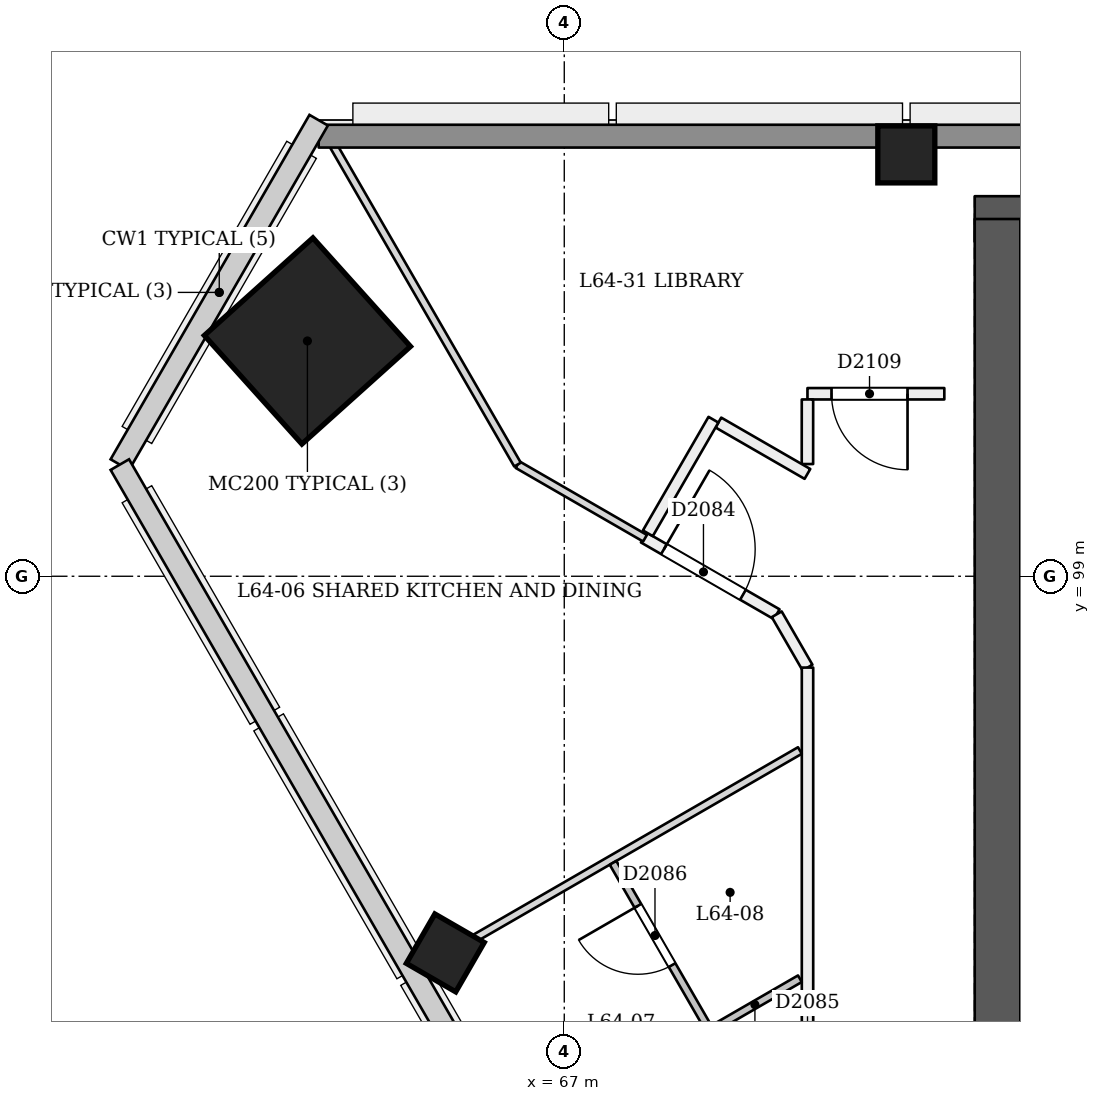
"""IFC4 building model, lengths in metres.
Left out: names, types, materials, properties, quantities, classifications, styles, units other than length and angle.
Written with IfcOpenShell. Run it as: python <this file> out.ifc"""

import sys

from ifc_helpers import new_model, si_unit, direction, frame, frame_2d, origin, origin_2d, place, context, subcontext, project, spatial, rectangle, extrude, element, fill, save


model = new_model("IFC4")
c1 = context("Model", 3, precision=1e-05, world=origin(), true_north=direction((0.0, 1.0)))
c2 = subcontext(c1, "Body", "Model", "MODEL_VIEW")
j1 = project(units=[si_unit("LENGTHUNIT", "METRE"), si_unit("PLANEANGLEUNIT", "RADIAN")], contexts=[c1])
p1 = place(None, origin())
s1 = spatial("IfcSite", under=j1, at=p1, CompositionType="ELEMENT")
p2 = place(p1, origin())
s2 = spatial("IfcBuilding", under=s1, at=p2, CompositionType="ELEMENT")
p3 = place(p2, frame((0.0, 0.0, 250.0)))
s3 = spatial("IfcBuildingStorey", under=s2, at=p3, CompositionType="ELEMENT", Elevation=250.0)
p4 = place(p3, frame((72.7, 93.1, 0.0), z_axis=(0.0, 0.0, 1.0), x_axis=(1.0, 0.0, 0.0)))
e1 = element("IfcWall", 1, at=p4, inside=s3, PredefinedType="SHEAR", context=c2, shape_type="SweptSolid", body=[
    extrude(rectangle(XDim=24.9, YDim=0.6, at=frame_2d((12.45, 0.0))), origin(), (0.0, 0.0, 1.0), 3.6),
])
p5 = place(p4, frame((1.1, 0.0, 0.0)))
e2 = element("IfcOpeningElement", 2, at=p5, cuts=e1, PredefinedType="OPENING", context=c2, shape_type="SweptSolid", body=[
    extrude(rectangle(XDim=1.2, YDim=2.1, at=frame_2d((0.6, 1.05))), frame((0.0, 0.311, 0.0), z_axis=(0.0, -1.0, 0.0), x_axis=(1.0, 0.0, 0.0)), (0.0, 0.0, 1.0), 0.621),
])
p6 = place(p4, frame((3.3, 0.0, 0.0)))
e3 = element("IfcOpeningElement", 3, at=p6, cuts=e1, PredefinedType="OPENING", context=c2, shape_type="SweptSolid", body=[
    extrude(rectangle(XDim=1.2, YDim=2.1, at=frame_2d((0.6, 1.05))), frame((0.0, 0.311, 0.0), z_axis=(0.0, -1.0, 0.0), x_axis=(1.0, 0.0, 0.0)), (0.0, 0.0, 1.0), 0.621),
])
p7 = place(p4, frame((13.3, 0.0, 0.0)))
e4 = element("IfcOpeningElement", 4, at=p7, cuts=e1, PredefinedType="OPENING", context=c2, shape_type="SweptSolid", body=[
    extrude(rectangle(XDim=1.2, YDim=2.1, at=frame_2d((0.6, 1.05))), frame((0.0, 0.311, 0.0), z_axis=(0.0, -1.0, 0.0), x_axis=(1.0, 0.0, 0.0)), (0.0, 0.0, 1.0), 0.621),
])
p8 = place(p4, frame((16.012, 0.0, 0.0)))
e5 = element("IfcOpeningElement", 5, at=p8, cuts=e1, PredefinedType="OPENING", context=c2, shape_type="SweptSolid", body=[
    extrude(rectangle(XDim=1.0, YDim=2.1, at=frame_2d((0.5, 1.05))), frame((0.0, 0.311, 0.0), z_axis=(0.0, -1.0, 0.0), x_axis=(1.0, 0.0, 0.0)), (0.0, 0.0, 1.0), 0.621),
])
p9 = place(p4, frame((19.9, 0.0, 0.0)))
e6 = element("IfcOpeningElement", 6, at=p9, cuts=e1, PredefinedType="OPENING", context=c2, shape_type="SweptSolid", body=[
    extrude(rectangle(XDim=1.0, YDim=2.1, at=frame_2d((0.5, 1.05))), frame((0.0, 0.311, 0.0), z_axis=(0.0, -1.0, 0.0), x_axis=(1.0, 0.0, 0.0)), (0.0, 0.0, 1.0), 0.621),
])
p10 = place(p4, frame((23.038, 0.0, 0.0)))
e7 = element("IfcOpeningElement", 7, at=p10, cuts=e1, PredefinedType="OPENING", context=c2, shape_type="SweptSolid", body=[
    extrude(rectangle(XDim=1.0, YDim=2.1, at=frame_2d((0.5, 1.05))), frame((0.0, 0.311, 0.0), z_axis=(0.0, -1.0, 0.0), x_axis=(1.0, 0.0, 0.0)), (0.0, 0.0, 1.0), 0.621),
])
p11 = place(p3, frame((97.3, 103.7, 0.0), z_axis=(0.0, 0.0, 1.0), x_axis=(-1.0, 0.0, 0.0)))
e8 = element("IfcWall", 8, at=p11, inside=s3, PredefinedType="SHEAR", context=c2, shape_type="SweptSolid", body=[
    extrude(rectangle(XDim=24.9, YDim=0.6, at=frame_2d((12.45, 0.0))), origin(), (0.0, 0.0, 1.0), 3.6),
])
p12 = place(p3, frame((72.7, 103.7, 0.0), z_axis=(0.0, 0.0, 1.0), x_axis=(0.0, -1.0, 0.0)))
e9 = element("IfcWall", 9, at=p12, inside=s3, PredefinedType="SHEAR", context=c2, shape_type="SweptSolid", body=[
    extrude(rectangle(XDim=10.9, YDim=0.6, at=frame_2d((5.45, 0.0))), origin(), (0.0, 0.0, 1.0), 3.6),
])
p13 = place(p3, frame((63.587, 102.084, 0.0), z_axis=(0.028401814599, 0.009218727412, 0.999554076572), x_axis=(-0.865118567614, 0.501170105714, 0.019959687064)))
e10 = element("IfcColumn", 10, at=p13, inside=s3, PredefinedType="COLUMN", context=c2, shape_type="SweptSolid", body=[
    extrude(rectangle(XDim=1.92, YDim=1.92, at=origin_2d()), origin(), (0.0, 0.0, 1.0), 3.602),
])
p14 = place(p3, frame((71.5, 104.55, 0.0), z_axis=(0.0, 0.0, 1.0), x_axis=(1.0, 0.0, 0.0)))
e11 = element("IfcColumn", 11, at=p14, inside=s3, PredefinedType="COLUMN", context=c2, shape_type="SweptSolid", body=[
    extrude(rectangle(XDim=0.75, YDim=0.75, at=origin_2d()), origin(), (0.0, 0.0, 1.0), 3.6),
])
p15 = place(p3, frame((65.407, 93.998, -0.023), z_axis=(0.022222852987, 0.038483477124, 0.999012095419), x_axis=(-0.865642023381, -0.499182098683, 0.038485318123)))
e12 = element("IfcColumn", 12, at=p15, inside=s3, PredefinedType="COLUMN", context=c2, shape_type="SweptSolid", body=[
    extrude(rectangle(XDim=0.75, YDim=0.75, at=origin_2d()), origin(), (0.0, 0.0, 1.0), 3.604),
])
p16 = place(p3, frame((68.046, 99.51, 0.0), z_axis=(0.0, 0.0, 1.0), x_axis=(0.866040685659, -0.499973530083, 0.0)))
e13 = element("IfcWall", 13, at=p16, inside=s3, PredefinedType="PARTITIONING", context=c2, shape_type="SweptSolid", body=[
    extrude(rectangle(XDim=2.02, YDim=0.15, at=frame_2d((1.01, 0.0))), origin(), (0.0, 0.0, 1.0), 3.2),
])
p17 = place(p16, frame((0.307, 0.0, 0.0)))
e14 = element("IfcOpeningElement", 14, at=p17, cuts=e13, PredefinedType="OPENING", context=c2, shape_type="SweptSolid", body=[
    extrude(rectangle(XDim=1.2, YDim=2.1, at=frame_2d((0.6, 1.05))), frame((0.0, 0.085, 0.0), z_axis=(0.0, -1.0, 0.0), x_axis=(1.0, 0.0, 0.0)), (0.0, 0.0, 1.0), 0.171),
])
p18 = place(p3, frame((69.795, 98.5, 0.0), z_axis=(0.0, 0.0, 1.0), x_axis=(0.499835541916, -0.866120332886, 0.0)))
e15 = element("IfcWall", 15, at=p18, inside=s3, PredefinedType="PARTITIONING", context=c2, shape_type="SweptSolid", body=[
    extrude(rectangle(XDim=0.81, YDim=0.15, at=frame_2d((0.405, 0.0))), origin(), (0.0, 0.0, 1.0), 3.2),
])
p19 = place(p3, frame((70.2, 97.799, 0.0), z_axis=(0.0, 0.0, 1.0), x_axis=(0.0, -1.0, 0.0)))
e16 = element("IfcWall", 16, at=p19, inside=s3, PredefinedType="PARTITIONING", context=c2, shape_type="SweptSolid", body=[
    extrude(rectangle(XDim=6.23, YDim=0.15, at=frame_2d((3.115, 0.0))), origin(), (0.0, 0.0, 1.0), 3.2),
])
p20 = place(p19, frame((4.668, 0.0, 0.0)))
e17 = element("IfcOpeningElement", 17, at=p20, cuts=e16, PredefinedType="OPENING", context=c2, shape_type="SweptSolid", body=[
    extrude(rectangle(XDim=1.1, YDim=2.1, at=frame_2d((0.55, 1.05))), frame((0.0, 0.085, 0.0), z_axis=(0.0, -1.0, 0.0), x_axis=(1.0, 0.0, 0.0)), (0.0, 0.0, 1.0), 0.171),
])
p21 = place(p3, frame((72.0, 101.401, 0.0), z_axis=(0.0, 0.0, 1.0), x_axis=(-1.0, 0.0, 0.0)))
e18 = element("IfcWall", 18, at=p21, inside=s3, PredefinedType="PARTITIONING", context=c2, shape_type="SweptSolid", body=[
    extrude(rectangle(XDim=1.801, YDim=0.15, at=frame_2d((0.9, 0.0))), origin(), (0.0, 0.0, 1.0), 3.2),
])
p22 = place(p21, frame((0.484, 0.0, 0.0)))
e19 = element("IfcOpeningElement", 19, at=p22, cuts=e18, PredefinedType="OPENING", context=c2, shape_type="SweptSolid", body=[
    extrude(rectangle(XDim=1.0, YDim=2.1, at=frame_2d((0.5, 1.05))), frame((0.0, 0.085, 0.0), z_axis=(0.0, -1.0, 0.0), x_axis=(1.0, 0.0, 0.0)), (0.0, 0.0, 1.0), 0.171),
])
p23 = place(p3, frame((70.199, 101.326, 0.0), z_axis=(0.0, 0.0, 1.0), x_axis=(-0.000574712549, -0.999999834853, 0.0)))
e20 = element("IfcWall", 20, at=p23, inside=s3, PredefinedType="PARTITIONING", context=c2, shape_type="SweptSolid", body=[
    extrude(rectangle(XDim=0.85, YDim=0.15, at=frame_2d((0.425, 0.0))), origin(), (0.0, 0.0, 1.0), 3.2),
])
p24 = place(p3, frame((70.199, 100.346, 0.0), z_axis=(0.0, 0.0, 1.0), x_axis=(-0.866191597034, 0.499712034304, 0.0)))
e21 = element("IfcWall", 21, at=p24, inside=s3, PredefinedType="PARTITIONING", context=c2, shape_type="SweptSolid", body=[
    extrude(rectangle(XDim=1.352, YDim=0.15, at=frame_2d((0.676, 0.0))), origin(), (0.0, 0.0, 1.0), 3.2),
])
p25 = place(p3, frame((68.963, 101.06, 0.0), z_axis=(0.0, 0.0, 1.0), x_axis=(-0.500110239729, -0.865961747491, 0.0)))
e22 = element("IfcWall", 22, at=p25, inside=s3, PredefinedType="PARTITIONING", context=c2, shape_type="SweptSolid", body=[
    extrude(rectangle(XDim=1.726, YDim=0.15, at=frame_2d((0.863, 0.0))), origin(), (0.0, 0.0, 1.0), 3.2),
])
p26 = place(p3, frame((65.105, 93.823, 0.0), z_axis=(0.0, 0.0, 1.0), x_axis=(0.866036153491, 0.4999813805, 0.0)))
e23 = element("IfcWall", 23, at=p26, inside=s3, PredefinedType="PARTITIONING", context=c2, shape_type="SweptSolid", body=[
    extrude(rectangle(XDim=5.768, YDim=0.1, at=frame_2d((2.884, 0.0))), origin(), (0.0, 0.0, 1.0), 2.7),
])
p27 = place(p3, frame((68.062, 99.5, 0.0), z_axis=(0.0, 0.0, 1.0), x_axis=(-0.866047038303, 0.499962526042, 0.0)))
e24 = element("IfcWall", 24, at=p27, inside=s3, PredefinedType="PARTITIONING", context=c2, shape_type="SweptSolid", body=[
    extrude(rectangle(XDim=1.937, YDim=0.1, at=frame_2d((0.968, 0.0))), origin(), (0.0, 0.0, 1.0), 3.2),
])
p28 = place(p3, frame((66.385, 100.469, 0.0), z_axis=(0.0, 0.0, 1.0), x_axis=(-0.500003314297, 0.866023490266, 0.0)))
e25 = element("IfcWall", 25, at=p28, inside=s3, PredefinedType="PARTITIONING", context=c2, shape_type="SweptSolid", body=[
    extrude(rectangle(XDim=5.117, YDim=0.1, at=frame_2d((2.558, 0.0))), origin(), (0.0, 0.0, 1.0), 2.7),
])
p29 = place(p3, frame((70.1, 93.705, 0.0), z_axis=(0.0, 0.0, 1.0), x_axis=(-0.8660249478, -0.500000789788, 0.0)))
e26 = element("IfcWall", 26, at=p29, inside=s3, PredefinedType="PARTITIONING", context=c2, shape_type="SweptSolid", body=[
    extrude(rectangle(XDim=1.367, YDim=0.1, at=frame_2d((0.683, 0.0))), origin(), (0.0, 0.0, 1.0), 3.2),
])
p30 = place(p3, frame((68.917, 93.022, 0.0), z_axis=(0.0, 0.0, 1.0), x_axis=(-0.500020783669, 0.866013403995, 0.0)))
e27 = element("IfcWall", 27, at=p30, inside=s3, PredefinedType="PARTITIONING", context=c2, shape_type="SweptSolid", body=[
    extrude(rectangle(XDim=2.55, YDim=0.1, at=frame_2d((1.275, 0.0))), origin(), (0.0, 0.0, 1.0), 3.2),
])
p31 = place(p30, frame((0.996, 0.0, 0.0)))
e28 = element("IfcOpeningElement", 28, at=p31, cuts=e27, PredefinedType="OPENING", context=c2, shape_type="SweptSolid", body=[
    extrude(rectangle(XDim=0.9, YDim=2.1, at=frame_2d((0.45, 1.05))), frame((0.0, 0.061, 0.0), z_axis=(0.0, -1.0, 0.0), x_axis=(1.0, 0.0, 0.0)), (0.0, 0.0, 1.0), 0.121),
])
p32 = place(p3, frame((63.769, 104.79, 0.0), z_axis=(0.0, 0.0, 1.0), x_axis=(1.0, 0.0, 0.0)))
e29 = element("IfcWall", 29, at=p32, inside=s3, PredefinedType="SOLIDWALL", context=c2, shape_type="SweptSolid", body=[
    extrude(rectangle(XDim=42.462, YDim=0.3, at=frame_2d((21.231, 0.0))), origin(), (0.0, 0.0, 1.0), 2.7),
])
p33 = place(p17, origin())
e30 = element("IfcDoor", 30, at=p33, inside=s3, OperationType="SINGLE_SWING_LEFT", PredefinedType="NOTDEFINED", context=c2, shape_type="SweptSolid", body=[
    extrude(rectangle(XDim=1.2, YDim=2.1, at=frame_2d((0.6, 1.05))), frame((0.0, 0.025, 0.0), z_axis=(0.0, -1.0, 0.0), x_axis=(1.0, 0.0, 0.0)), (0.0, 0.0, 1.0), 0.05),
])
fill(e14, e30)
p34 = place(p31, origin())
e31 = element("IfcDoor", 31, at=p34, inside=s3, OperationType="SINGLE_SWING_RIGHT", PredefinedType="NOTDEFINED", context=c2, shape_type="SweptSolid", body=[
    extrude(rectangle(XDim=0.9, YDim=2.1, at=frame_2d((0.45, 1.05))), frame((0.0, 0.025, 0.0), z_axis=(0.0, -1.0, 0.0), x_axis=(1.0, 0.0, 0.0)), (0.0, 0.0, 1.0), 0.05),
])
fill(e28, e31)
p35 = place(p22, origin())
e32 = element("IfcDoor", 32, at=p35, inside=s3, OperationType="SINGLE_SWING_LEFT", PredefinedType="NOTDEFINED", context=c2, shape_type="SweptSolid", body=[
    extrude(rectangle(XDim=1.0, YDim=2.1, at=frame_2d((0.5, 1.05))), frame((0.0, 0.025, 0.0), z_axis=(0.0, -1.0, 0.0), x_axis=(1.0, 0.0, 0.0)), (0.0, 0.0, 1.0), 0.05),
])
fill(e19, e32)
save(model, sys.argv[1])
